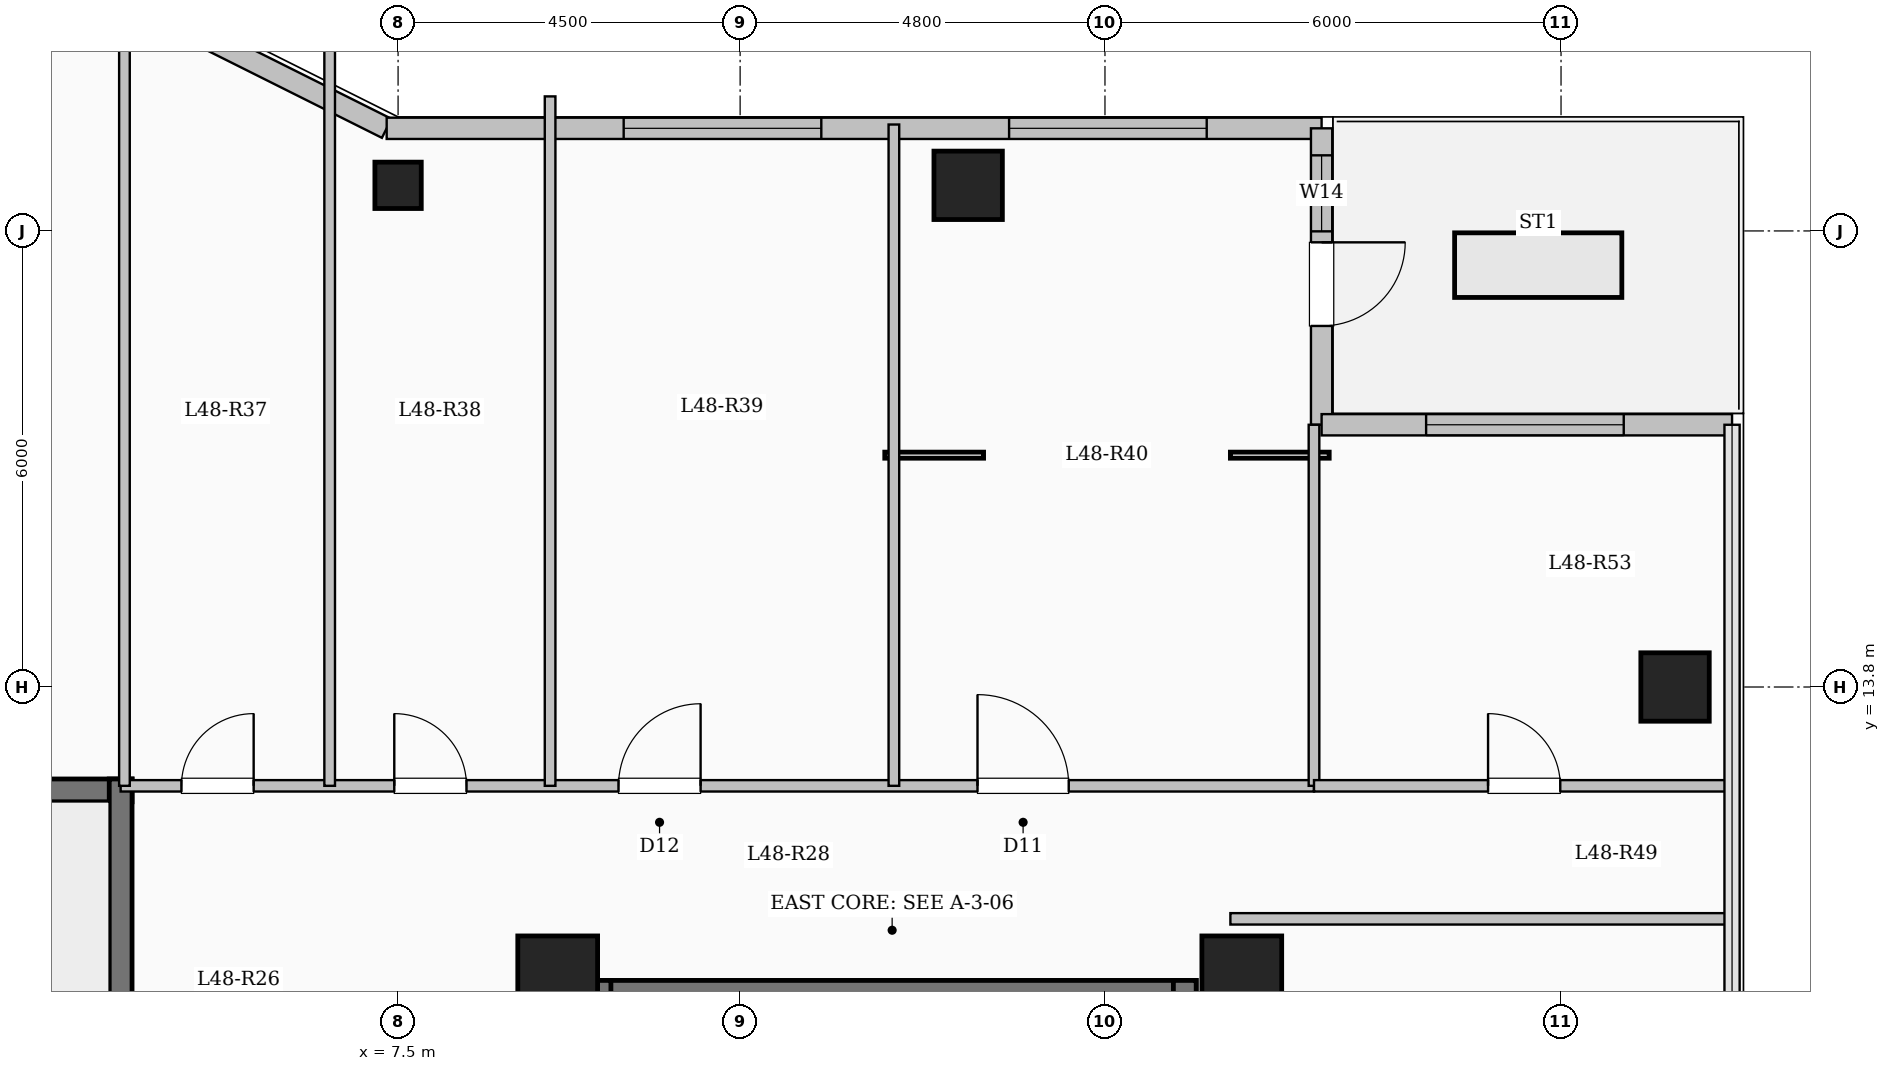
"""IFC4 building model, lengths in metres.
Left out: names, types, materials, properties, quantities, classifications, styles, units other than length and angle.
Written with IfcOpenShell. Run it as: python <this file> out.ifc"""

import sys

from ifc_helpers import new_model, si_unit, direction, frame, frame_2d, origin, origin_2d, place, context, subcontext, project, spatial, rectangle, hollow_circle, extrude, element, fill, save


model = new_model("IFC4")
c1 = context("Model", 3, precision=1e-05, world=origin(), true_north=direction((0.0, 1.0)))
c2 = subcontext(c1, "Body", "Model", "MODEL_VIEW")
j1 = project(units=[si_unit("LENGTHUNIT", "METRE"), si_unit("PLANEANGLEUNIT", "RADIAN")], contexts=[c1])
p1 = place(None, origin())
s1 = spatial("IfcSite", under=j1, at=p1, CompositionType="ELEMENT")
p2 = place(p1, origin())
s2 = spatial("IfcBuilding", under=s1, at=p2, CompositionType="ELEMENT")
p3 = place(p2, frame((0.0, 0.0, 177.3)))
s3 = spatial("IfcBuildingStorey", under=s2, at=p3, CompositionType="ELEMENT", Elevation=177.3)
for number, where, z_axis, x_axis in (
    (1, (9.6, 10.0, 0.0), (0.0, 0.0, 1.0), (1.0, 0.0, 0.0)),
    (2, (18.6, 10.0, 0.0), (0.0, 0.0, 1.0), (1.0, 0.0, 0.0)),
):
    element("IfcColumn", number, at=place(p3, frame(where, z_axis=z_axis, x_axis=x_axis)), inside=s3, PredefinedType="COLUMN", context=c2, shape_type="SweptSolid", body=[
        extrude(rectangle(XDim=1.05, YDim=1.05, at=origin_2d()), origin(), (0.0, 0.0, 1.0), 4.5),
    ])
p4 = place(p3, frame((7.5, 20.4, 0.0), z_axis=(0.0, 0.0, 1.0), x_axis=(1.0, 0.0, 0.0)))
e3 = element("IfcColumn", 3, at=p4, inside=s3, PredefinedType="COLUMN", context=c2, shape_type="SweptSolid", body=[
    extrude(hollow_circle(Radius=0.305, WallThickness=0.025, at=origin_2d()), origin(), (0.0, 0.0, 1.0), 4.5),
])
for number, where, z_axis, x_axis in (
    (4, (15.0, 20.4, 0.0), (0.0, 0.0, 1.0), (1.0, 0.0, 0.0)),
    (5, (24.3, 13.8, 0.0), (0.0, 0.0, 1.0), (1.0, 0.0, 0.0)),
):
    element("IfcColumn", number, at=place(p3, frame(where, z_axis=z_axis, x_axis=x_axis)), inside=s3, PredefinedType="COLUMN", context=c2, shape_type="SweptSolid", body=[
        extrude(rectangle(XDim=0.9, YDim=0.9, at=origin_2d()), origin(), (0.0, 0.0, 1.0), 4.5),
    ])
p5 = place(p3, frame((4.35, 22.65, 0.0), z_axis=(0.0, 0.0, 1.0), x_axis=(0.894427191, -0.4472135955, 0.0)))
e6 = element("IfcWall", 6, at=p5, inside=s3, PredefinedType="SOLIDWALL", context=c2, shape_type="SweptSolid", body=[
    extrude(rectangle(XDim=3.354, YDim=0.28, at=frame_2d((1.677, 0.0))), origin(), (0.0, 0.0, 1.0), 4.2),
])
p6 = place(p3, frame((7.35, 21.15, 0.0), z_axis=(0.0, 0.0, 1.0), x_axis=(1.0, 0.0, 0.0)))
e7 = element("IfcWall", 7, at=p6, inside=s3, PredefinedType="SOLIDWALL", context=c2, shape_type="SweptSolid", body=[
    extrude(rectangle(XDim=12.3, YDim=0.28, at=frame_2d((6.15, 0.0))), origin(), (0.0, 0.0, 1.0), 4.2),
])
p7 = place(p6, frame((3.118, 0.0, 0.85)))
e8 = element("IfcOpeningElement", 8, at=p7, cuts=e7, PredefinedType="OPENING", context=c2, shape_type="SweptSolid", body=[
    extrude(rectangle(XDim=2.6, YDim=2.4, at=frame_2d((1.3, 1.2))), frame((0.0, 0.15, 0.0), z_axis=(0.0, -1.0, 0.0), x_axis=(1.0, 0.0, 0.0)), (0.0, 0.0, 1.0), 0.3),
])
p8 = place(p6, frame((8.189, 0.0, 0.85)))
e9 = element("IfcOpeningElement", 9, at=p8, cuts=e7, PredefinedType="OPENING", context=c2, shape_type="SweptSolid", body=[
    extrude(rectangle(XDim=2.6, YDim=2.4, at=frame_2d((1.3, 1.2))), frame((0.0, 0.15, 0.0), z_axis=(0.0, -1.0, 0.0), x_axis=(1.0, 0.0, 0.0)), (0.0, 0.0, 1.0), 0.3),
])
p9 = place(p3, frame((19.65, 21.15, 0.0), z_axis=(0.0, 0.0, 1.0), x_axis=(0.0, -1.0, 0.0)))
e10 = element("IfcWall", 10, at=p9, inside=s3, PredefinedType="SOLIDWALL", context=c2, shape_type="SweptSolid", body=[
    extrude(rectangle(XDim=3.9, YDim=0.28, at=frame_2d((1.95, 0.0))), origin(), (0.0, 0.0, 1.0), 4.2),
])
p10 = place(p9, frame((1.5, 0.0, 0.0)))
e11 = element("IfcOpeningElement", 11, at=p10, cuts=e10, PredefinedType="OPENING", context=c2, shape_type="SweptSolid", body=[
    extrude(rectangle(XDim=1.1, YDim=2.2, at=frame_2d((0.55, 1.1))), frame((0.0, 0.15, 0.0), z_axis=(0.0, -1.0, 0.0), x_axis=(1.0, 0.0, 0.0)), (0.0, 0.0, 1.0), 0.3),
])
p11 = place(p9, frame((0.355, 0.0, 0.95)))
e12 = element("IfcOpeningElement", 12, at=p11, cuts=e10, PredefinedType="OPENING", context=c2, shape_type="SweptSolid", body=[
    extrude(rectangle(XDim=1.0, YDim=1.5, at=frame_2d((0.5, 0.75))), frame((0.0, 0.15, 0.0), z_axis=(0.0, -1.0, 0.0), x_axis=(1.0, 0.0, 0.0)), (0.0, 0.0, 1.0), 0.3),
])
p12 = place(p3, frame((19.65, 17.25, 0.0), z_axis=(0.0, 0.0, 1.0), x_axis=(1.0, 0.0, 0.0)))
e13 = element("IfcWall", 13, at=p12, inside=s3, PredefinedType="SOLIDWALL", context=c2, shape_type="SweptSolid", body=[
    extrude(rectangle(XDim=5.4, YDim=0.28, at=frame_2d((2.7, 0.0))), origin(), (0.0, 0.0, 1.0), 4.2),
])
p13 = place(p12, frame((1.375, 0.0, 0.85)))
e14 = element("IfcOpeningElement", 14, at=p13, cuts=e13, PredefinedType="OPENING", context=c2, shape_type="SweptSolid", body=[
    extrude(rectangle(XDim=2.6, YDim=2.4, at=frame_2d((1.3, 1.2))), frame((0.0, 0.15, 0.0), z_axis=(0.0, -1.0, 0.0), x_axis=(1.0, 0.0, 0.0)), (0.0, 0.0, 1.0), 0.3),
])
p14 = place(p3, frame((10.0, 9.79, 0.0), z_axis=(0.0, 0.0, 1.0), x_axis=(1.0, 0.0, 0.0)))
e15 = element("IfcWall", 15, at=p14, inside=s3, PredefinedType="SHEAR", context=c2, shape_type="SweptSolid", body=[
    extrude(rectangle(XDim=8.0, YDim=0.3, at=frame_2d((4.0, 0.0))), origin(), (0.0, 0.0, 1.0), 4.5),
])
for number, where, z_axis, x_axis in (
    (16, (10.15, 6.35, 0.0), (0.0, 0.0, 1.0), (0.0, 1.0, 0.0)),
    (17, (17.85, 6.35, 0.0), (0.0, 0.0, 1.0), (0.0, 1.0, 0.0)),
):
    element("IfcWall", number, at=place(p3, frame(where, z_axis=z_axis, x_axis=x_axis)), inside=s3, PredefinedType="SHEAR", context=c2, shape_type="SweptSolid", body=[
        extrude(rectangle(XDim=3.59, YDim=0.3, at=frame_2d((1.795, 0.0))), origin(), (0.0, 0.0, 1.0), 4.5),
    ])
p15 = place(p3, frame((-4.0, 12.44, 0.0), z_axis=(0.0, 0.0, 1.0), x_axis=(1.0, 0.0, 0.0)))
e18 = element("IfcWall", 18, at=p15, inside=s3, PredefinedType="SHEAR", context=c2, shape_type="SweptSolid", body=[
    extrude(rectangle(XDim=8.0, YDim=0.3, at=frame_2d((4.0, 0.0))), origin(), (0.0, 0.0, 1.0), 4.5),
])
p16 = place(p3, frame((3.85, 9.0, 0.0), z_axis=(0.0, 0.0, 1.0), x_axis=(0.0, 1.0, 0.0)))
e19 = element("IfcWall", 19, at=p16, inside=s3, PredefinedType="SHEAR", context=c2, shape_type="SweptSolid", body=[
    extrude(rectangle(XDim=3.59, YDim=0.3, at=frame_2d((1.795, 0.0))), origin(), (0.0, 0.0, 1.0), 4.5),
])
p17 = place(p3, frame((3.85, 12.5, 0.0), z_axis=(0.0, 0.0, 1.0), x_axis=(1.0, 0.0, 0.0)))
e20 = element("IfcWall", 20, at=p17, inside=s3, PredefinedType="PARTITIONING", context=c2, shape_type="SweptSolid", body=[
    extrude(rectangle(XDim=15.7, YDim=0.15, at=frame_2d((7.85, 0.0))), origin(), (0.0, 0.0, 1.0), 4.2),
])
p18 = place(p17, frame((0.8, 0.0, 0.0)))
e21 = element("IfcOpeningElement", 21, at=p18, cuts=e20, PredefinedType="OPENING", context=c2, shape_type="SweptSolid", body=[
    extrude(rectangle(XDim=0.95, YDim=2.15, at=frame_2d((0.475, 1.075))), frame((0.0, 0.085, 0.0), z_axis=(0.0, -1.0, 0.0), x_axis=(1.0, 0.0, 0.0)), (0.0, 0.0, 1.0), 0.17),
])
p19 = place(p17, frame((3.6, 0.0, 0.0)))
e22 = element("IfcOpeningElement", 22, at=p19, cuts=e20, PredefinedType="OPENING", context=c2, shape_type="SweptSolid", body=[
    extrude(rectangle(XDim=0.95, YDim=2.15, at=frame_2d((0.475, 1.075))), frame((0.0, 0.085, 0.0), z_axis=(0.0, -1.0, 0.0), x_axis=(1.0, 0.0, 0.0)), (0.0, 0.0, 1.0), 0.17),
])
p20 = place(p17, frame((6.55, 0.0, 0.0)))
e23 = element("IfcOpeningElement", 23, at=p20, cuts=e20, PredefinedType="OPENING", context=c2, shape_type="SweptSolid", body=[
    extrude(rectangle(XDim=1.08, YDim=2.15, at=frame_2d((0.54, 1.075))), frame((0.0, 0.085, 0.0), z_axis=(0.0, -1.0, 0.0), x_axis=(1.0, 0.0, 0.0)), (0.0, 0.0, 1.0), 0.17),
])
p21 = place(p17, frame((11.273, 0.0, 0.0)))
e24 = element("IfcOpeningElement", 24, at=p21, cuts=e20, PredefinedType="OPENING", context=c2, shape_type="SweptSolid", body=[
    extrude(rectangle(XDim=1.2, YDim=2.15, at=frame_2d((0.6, 1.075))), frame((0.0, 0.085, 0.0), z_axis=(0.0, -1.0, 0.0), x_axis=(1.0, 0.0, 0.0)), (0.0, 0.0, 1.0), 0.17),
])
p22 = place(p3, frame((3.9, 12.5, 0.0), z_axis=(0.0, 0.0, 1.0), x_axis=(0.0, 1.0, 0.0)))
e25 = element("IfcWall", 25, at=p22, inside=s3, PredefinedType="PARTITIONING", context=c2, shape_type="SweptSolid", body=[
    extrude(rectangle(XDim=10.18, YDim=0.14, at=frame_2d((5.09, 0.0))), origin(), (0.0, 0.0, 1.0), 4.2),
])
p23 = place(p3, frame((6.6, 12.5, 0.0), z_axis=(0.0, 0.0, 1.0), x_axis=(0.0, 1.0, 0.0)))
e26 = element("IfcWall", 26, at=p23, inside=s3, PredefinedType="PARTITIONING", context=c2, shape_type="SweptSolid", body=[
    extrude(rectangle(XDim=9.785, YDim=0.14, at=frame_2d((4.893, 0.0))), origin(), (0.0, 0.0, 1.0), 4.2),
])
p24 = place(p3, frame((9.5, 12.5, 0.0), z_axis=(0.0, 0.0, 1.0), x_axis=(0.0, 1.0, 0.0)))
e27 = element("IfcWall", 27, at=p24, inside=s3, PredefinedType="PARTITIONING", context=c2, shape_type="SweptSolid", body=[
    extrude(rectangle(XDim=9.07, YDim=0.14, at=frame_2d((4.535, 0.0))), origin(), (0.0, 0.0, 1.0), 4.2),
])
p25 = place(p3, frame((14.023, 12.5, 0.0), z_axis=(0.0, 0.0, 1.0), x_axis=(0.0, 1.0, 0.0)))
e28 = element("IfcWall", 28, at=p25, inside=s3, PredefinedType="PARTITIONING", context=c2, shape_type="SweptSolid", body=[
    extrude(rectangle(XDim=8.7, YDim=0.14, at=frame_2d((4.35, 0.0))), origin(), (0.0, 0.0, 1.0), 4.2),
])
p26 = place(p3, frame((18.45, 10.75, 0.0), z_axis=(0.0, 0.0, 1.0), x_axis=(1.0, 0.0, 0.0)))
e29 = element("IfcWall", 29, at=p26, inside=s3, PredefinedType="PARTITIONING", context=c2, shape_type="SweptSolid", body=[
    extrude(rectangle(XDim=6.63, YDim=0.15, at=frame_2d((3.315, 0.0))), origin(), (0.0, 0.0, 1.0), 4.2),
])
p27 = place(p3, frame((19.55, 12.5, 0.0), z_axis=(0.0, 0.0, 1.0), x_axis=(0.0, 1.0, 0.0)))
e30 = element("IfcWall", 30, at=p27, inside=s3, PredefinedType="PARTITIONING", context=c2, shape_type="SweptSolid", body=[
    extrude(rectangle(XDim=4.75, YDim=0.14, at=frame_2d((2.375, 0.0))), origin(), (0.0, 0.0, 1.0), 4.2),
])
p28 = place(p3, frame((19.55, 12.5, 0.0), z_axis=(0.0, 0.0, 1.0), x_axis=(1.0, 0.0, 0.0)))
e31 = element("IfcWall", 31, at=p28, inside=s3, PredefinedType="PARTITIONING", context=c2, shape_type="SweptSolid", body=[
    extrude(rectangle(XDim=5.53, YDim=0.15, at=frame_2d((2.765, 0.0))), origin(), (0.0, 0.0, 1.0), 4.2),
])
p29 = place(p28, frame((2.29, 0.0, 0.0)))
e32 = element("IfcOpeningElement", 32, at=p29, cuts=e31, PredefinedType="OPENING", context=c2, shape_type="SweptSolid", body=[
    extrude(rectangle(XDim=0.95, YDim=2.15, at=frame_2d((0.475, 1.075))), frame((0.0, 0.085, 0.0), z_axis=(0.0, -1.0, 0.0), x_axis=(1.0, 0.0, 0.0)), (0.0, 0.0, 1.0), 0.17),
])
p30 = place(p7, origin())
e33 = element("IfcWindow", 33, at=p30, inside=s3, PartitioningType="SINGLE_PANEL", PredefinedType="WINDOW", context=c2, shape_type="SweptSolid", body=[
    extrude(rectangle(XDim=2.6, YDim=2.4, at=frame_2d((1.3, 1.2))), frame((0.0, 0.03, 0.0), z_axis=(0.0, -1.0, 0.0), x_axis=(1.0, 0.0, 0.0)), (0.0, 0.0, 1.0), 0.06),
])
fill(e8, e33)
p31 = place(p8, origin())
e34 = element("IfcWindow", 34, at=p31, inside=s3, PartitioningType="SINGLE_PANEL", PredefinedType="WINDOW", context=c2, shape_type="SweptSolid", body=[
    extrude(rectangle(XDim=2.6, YDim=2.4, at=frame_2d((1.3, 1.2))), frame((0.0, 0.03, 0.0), z_axis=(0.0, -1.0, 0.0), x_axis=(1.0, 0.0, 0.0)), (0.0, 0.0, 1.0), 0.06),
])
fill(e9, e34)
p32 = place(p10, origin())
e35 = element("IfcDoor", 35, at=p32, inside=s3, OperationType="SINGLE_SWING_LEFT", PredefinedType="DOOR", context=c2, shape_type="SweptSolid", body=[
    extrude(rectangle(XDim=1.1, YDim=2.2, at=frame_2d((0.55, 1.1))), frame((0.0, 0.025, 0.0), z_axis=(0.0, -1.0, 0.0), x_axis=(1.0, 0.0, 0.0)), (0.0, 0.0, 1.0), 0.05),
])
fill(e11, e35)
p33 = place(p11, origin())
e36 = element("IfcWindow", 36, at=p33, inside=s3, PartitioningType="SINGLE_PANEL", PredefinedType="WINDOW", context=c2, shape_type="SweptSolid", body=[
    extrude(rectangle(XDim=1.0, YDim=1.5, at=frame_2d((0.5, 0.75))), frame((0.0, 0.03, 0.0), z_axis=(0.0, -1.0, 0.0), x_axis=(1.0, 0.0, 0.0)), (0.0, 0.0, 1.0), 0.06),
])
fill(e12, e36)
p34 = place(p13, origin())
e37 = element("IfcWindow", 37, at=p34, inside=s3, PartitioningType="SINGLE_PANEL", PredefinedType="WINDOW", context=c2, shape_type="SweptSolid", body=[
    extrude(rectangle(XDim=2.6, YDim=2.4, at=frame_2d((1.3, 1.2))), frame((0.0, 0.03, 0.0), z_axis=(0.0, -1.0, 0.0), x_axis=(1.0, 0.0, 0.0)), (0.0, 0.0, 1.0), 0.06),
])
fill(e14, e37)
p35 = place(p18, origin())
e38 = element("IfcDoor", 38, at=p35, inside=s3, OperationType="SINGLE_SWING_RIGHT", PredefinedType="DOOR", context=c2, shape_type="SweptSolid", body=[
    extrude(rectangle(XDim=0.95, YDim=2.15, at=frame_2d((0.475, 1.075))), frame((0.0, 0.025, 0.0), z_axis=(0.0, -1.0, 0.0), x_axis=(1.0, 0.0, 0.0)), (0.0, 0.0, 1.0), 0.05),
])
fill(e21, e38)
p36 = place(p19, origin())
e39 = element("IfcDoor", 39, at=p36, inside=s3, OperationType="SINGLE_SWING_LEFT", PredefinedType="DOOR", context=c2, shape_type="SweptSolid", body=[
    extrude(rectangle(XDim=0.95, YDim=2.15, at=frame_2d((0.475, 1.075))), frame((0.0, 0.025, 0.0), z_axis=(0.0, -1.0, 0.0), x_axis=(1.0, 0.0, 0.0)), (0.0, 0.0, 1.0), 0.05),
])
fill(e22, e39)
p37 = place(p20, origin())
e40 = element("IfcDoor", 40, at=p37, inside=s3, OperationType="SINGLE_SWING_RIGHT", PredefinedType="DOOR", context=c2, shape_type="SweptSolid", body=[
    extrude(rectangle(XDim=1.08, YDim=2.15, at=frame_2d((0.54, 1.075))), frame((0.0, 0.025, 0.0), z_axis=(0.0, -1.0, 0.0), x_axis=(1.0, 0.0, 0.0)), (0.0, 0.0, 1.0), 0.05),
])
fill(e23, e40)
p38 = place(p21, origin())
e41 = element("IfcDoor", 41, at=p38, inside=s3, OperationType="SINGLE_SWING_LEFT", PredefinedType="DOOR", context=c2, shape_type="SweptSolid", body=[
    extrude(rectangle(XDim=1.2, YDim=2.15, at=frame_2d((0.6, 1.075))), frame((0.0, 0.025, 0.0), z_axis=(0.0, -1.0, 0.0), x_axis=(1.0, 0.0, 0.0)), (0.0, 0.0, 1.0), 0.05),
])
fill(e24, e41)
p39 = place(p29, origin())
e42 = element("IfcDoor", 42, at=p39, inside=s3, OperationType="SINGLE_SWING_LEFT", PredefinedType="DOOR", context=c2, shape_type="SweptSolid", body=[
    extrude(rectangle(XDim=0.95, YDim=2.15, at=frame_2d((0.475, 1.075))), frame((0.0, 0.025, 0.0), z_axis=(0.0, -1.0, 0.0), x_axis=(1.0, 0.0, 0.0)), (0.0, 0.0, 1.0), 0.05),
])
fill(e32, e42)
save(model, sys.argv[1])
